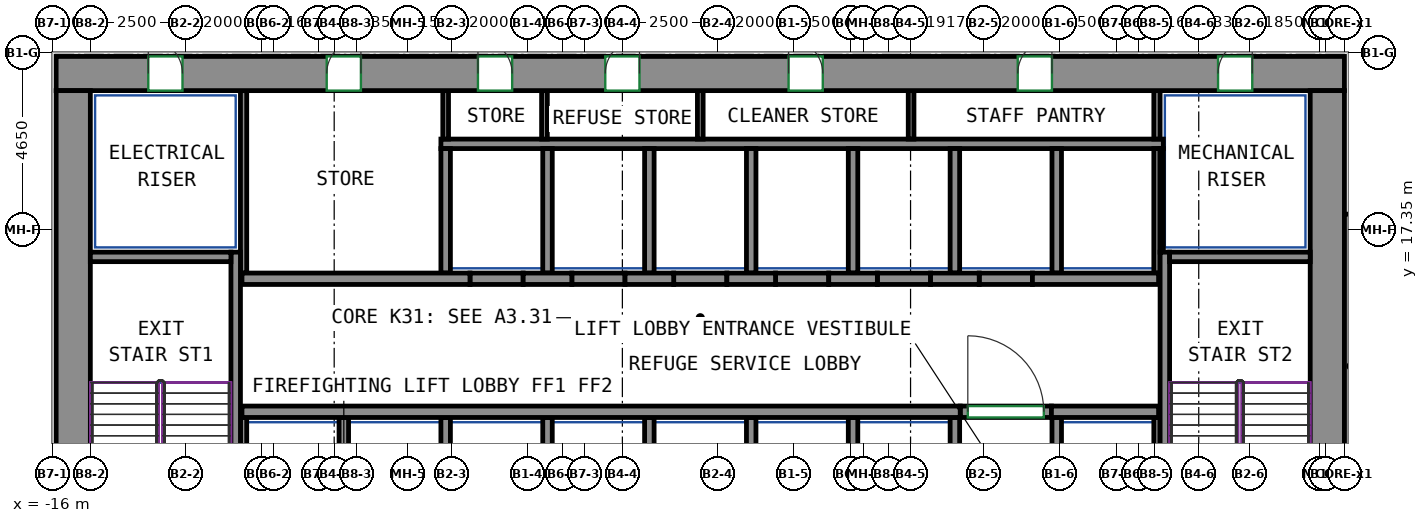
"""IFC4 building model, lengths in metres.
Left out: names, types, materials, properties, quantities, classifications, styles, units other than length and angle.
Written with IfcOpenShell. Run it as: python <this file> out.ifc"""

import sys

from ifc_helpers import new_model, si_unit, direction, frame, frame_2d, origin, place, context, subcontext, project, spatial, rectangle, extrude, source, transform, mapped, element, fill, save


model = new_model("IFC4")
c1 = context("Model", 3, precision=1e-05, world=origin(), true_north=direction((0.0, 1.0)))
c2 = subcontext(c1, "Body", "Model", "MODEL_VIEW")
j1 = project(units=[si_unit("LENGTHUNIT", "METRE"), si_unit("PLANEANGLEUNIT", "RADIAN")], contexts=[c1])
p1 = place(None, origin())
s1 = spatial("IfcSite", under=j1, at=p1, CompositionType="ELEMENT")
p2 = place(p1, origin())
s2 = spatial("IfcBuilding", under=s1, at=p2, CompositionType="ELEMENT")
p3 = place(p2, frame((0.0, 0.0, 128.6)))
s3 = spatial("IfcBuildingStorey", under=s2, at=p3, CompositionType="ELEMENT", Elevation=128.6)
m1 = source(origin(), c2, "Body", "SweptSolid", [
    extrude(rectangle(XDim=33.9, YDim=0.9, at=frame_2d((16.95, 0.0))), origin(), (0.0, 0.0, 1.0), 9.5),
])
p4 = place(p3, frame((-15.9, 21.45, 0.0), z_axis=(0.0, 0.0, 1.0), x_axis=(1.0, 0.0, 0.0)))
e1 = element("IfcWall", 1, at=p4, inside=s3, PredefinedType="SHEAR", context=c2, shape_type="MappedRepresentation", body=[
    mapped(m1, transform((0.0, 0.0, 0.0))),
])
p5 = place(p4, frame((7.12, 0.0, 0.0)))
e2 = element("IfcOpeningElement", 2, at=p5, cuts=e1, PredefinedType="OPENING", context=c2, shape_type="SweptSolid", body=[
    extrude(rectangle(XDim=0.9, YDim=2.1, at=frame_2d((0.45, 1.05))), frame((0.0, 0.46, 0.0), z_axis=(0.0, -1.0, 0.0), x_axis=(1.0, 0.0, 0.0)), (0.0, 0.0, 1.0), 0.92),
])
p6 = place(p4, frame((11.1, 0.0, 0.0)))
e3 = element("IfcOpeningElement", 3, at=p6, cuts=e1, PredefinedType="OPENING", context=c2, shape_type="SweptSolid", body=[
    extrude(rectangle(XDim=0.9, YDim=2.1, at=frame_2d((0.45, 1.05))), frame((0.0, 0.46, 0.0), z_axis=(0.0, -1.0, 0.0), x_axis=(1.0, 0.0, 0.0)), (0.0, 0.0, 1.0), 0.92),
])
p7 = place(p4, frame((14.45, 0.0, 0.0)))
e4 = element("IfcOpeningElement", 4, at=p7, cuts=e1, PredefinedType="OPENING", context=c2, shape_type="SweptSolid", body=[
    extrude(rectangle(XDim=0.9, YDim=2.1, at=frame_2d((0.45, 1.05))), frame((0.0, 0.46, 0.0), z_axis=(0.0, -1.0, 0.0), x_axis=(1.0, 0.0, 0.0)), (0.0, 0.0, 1.0), 0.92),
])
p8 = place(p4, frame((19.274, 0.0, 0.0)))
e5 = element("IfcOpeningElement", 5, at=p8, cuts=e1, PredefinedType="OPENING", context=c2, shape_type="SweptSolid", body=[
    extrude(rectangle(XDim=0.9, YDim=2.1, at=frame_2d((0.45, 1.05))), frame((0.0, 0.46, 0.0), z_axis=(0.0, -1.0, 0.0), x_axis=(1.0, 0.0, 0.0)), (0.0, 0.0, 1.0), 0.92),
])
p9 = place(p4, frame((25.304, 0.0, 0.0)))
e6 = element("IfcOpeningElement", 6, at=p9, cuts=e1, PredefinedType="OPENING", context=c2, shape_type="SweptSolid", body=[
    extrude(rectangle(XDim=0.9, YDim=2.1, at=frame_2d((0.45, 1.05))), frame((0.0, 0.46, 0.0), z_axis=(0.0, -1.0, 0.0), x_axis=(1.0, 0.0, 0.0)), (0.0, 0.0, 1.0), 0.92),
])
p10 = place(p4, frame((2.425, 0.0, 0.0)))
e7 = element("IfcOpeningElement", 7, at=p10, cuts=e1, PredefinedType="OPENING", context=c2, shape_type="SweptSolid", body=[
    extrude(rectangle(XDim=0.9, YDim=2.1, at=frame_2d((0.45, 1.05))), frame((0.0, 0.46, 0.0), z_axis=(0.0, -1.0, 0.0), x_axis=(1.0, 0.0, 0.0)), (0.0, 0.0, 1.0), 0.92),
])
p11 = place(p4, frame((30.575, 0.0, 0.0)))
e8 = element("IfcOpeningElement", 8, at=p11, cuts=e1, PredefinedType="OPENING", context=c2, shape_type="SweptSolid", body=[
    extrude(rectangle(XDim=0.9, YDim=2.1, at=frame_2d((0.45, 1.05))), frame((0.0, 0.46, 0.0), z_axis=(0.0, -1.0, 0.0), x_axis=(1.0, 0.0, 0.0)), (0.0, 0.0, 1.0), 0.92),
])
m2 = source(origin(), c2, "Body", "SweptSolid", [
    extrude(rectangle(XDim=12.0, YDim=0.9, at=frame_2d((6.0, 0.0))), origin(), (0.0, 0.0, 1.0), 9.5),
])
for number, where, z_axis, x_axis in (
    (9, (-15.45, 9.0, 0.0), (0.0, 0.0, 1.0), (0.0, 1.0, 0.0)),
    (10, (17.55, 9.0, 0.0), (0.0, 0.0, 1.0), (0.0, 1.0, 0.0)),
):
    element("IfcWall", number, at=place(p3, frame(where, z_axis=z_axis, x_axis=x_axis)), inside=s3, PredefinedType="SHEAR", context=c2, shape_type="MappedRepresentation", body=[
        mapped(m2, transform((0.0, 0.0, 0.0))),
    ])
m3 = source(origin(), c2, "Body", "SweptSolid", [
    extrude(rectangle(XDim=7.75, YDim=0.25, at=frame_2d((3.875, 0.0))), origin(), (0.0, 0.0, 1.0), 9.5),
])
p12 = place(p3, frame((-11.175, 9.0, 0.0), z_axis=(0.0, 0.0, 1.0), x_axis=(0.0, 1.0, 0.0)))
e11 = element("IfcWall", 11, at=p12, inside=s3, PredefinedType="SHEAR", context=c2, shape_type="MappedRepresentation", body=[
    mapped(m3, transform((0.0, 0.0, 0.0))),
])
m4 = source(origin(), c2, "Body", "SweptSolid", [
    extrude(rectangle(XDim=3.7, YDim=0.25, at=frame_2d((1.85, 0.0))), origin(), (0.0, 0.0, 1.0), 9.5),
])
p13 = place(p3, frame((-15.0, 16.625, 0.0), z_axis=(0.0, 0.0, 1.0), x_axis=(1.0, 0.0, 0.0)))
e12 = element("IfcWall", 12, at=p13, inside=s3, PredefinedType="SHEAR", context=c2, shape_type="MappedRepresentation", body=[
    mapped(m4, transform((0.0, 0.0, 0.0))),
])
p14 = place(p3, frame((13.275, 9.0, 0.0), z_axis=(0.0, 0.0, 1.0), x_axis=(0.0, 1.0, 0.0)))
e13 = element("IfcWall", 13, at=p14, inside=s3, PredefinedType="SHEAR", context=c2, shape_type="MappedRepresentation", body=[
    mapped(m3, transform((0.0, 0.0, 0.0))),
])
m5 = source(origin(), c2, "Body", "SweptSolid", [
    extrude(rectangle(XDim=3.7, YDim=0.25, at=frame_2d((1.85, 0.0))), origin(), (0.0, 0.0, 1.0), 9.5),
])
p15 = place(p3, frame((13.4, 16.625, 0.0), z_axis=(0.0, 0.0, 1.0), x_axis=(1.0, 0.0, 0.0)))
e14 = element("IfcWall", 14, at=p15, inside=s3, PredefinedType="SHEAR", context=c2, shape_type="MappedRepresentation", body=[
    mapped(m5, transform((0.0, 0.0, 0.0))),
])
m6 = source(origin(), c2, "Body", "SweptSolid", [
    extrude(rectangle(XDim=8.0, YDim=0.35, at=frame_2d((4.0, 0.0))), origin(), (0.0, 0.0, 1.0), 9.5),
])
p16 = place(p3, frame((18.175, 9.75, 0.0), z_axis=(0.0, 0.0, 1.0), x_axis=(0.0, 1.0, 0.0)))
e15 = element("IfcWall", 15, at=p16, inside=s3, PredefinedType="SHEAR", context=c2, shape_type="MappedRepresentation", body=[
    mapped(m6, transform((0.0, 0.0, 0.0))),
])
m7 = source(origin(), c2, "Body", "SweptSolid", [
    extrude(rectangle(XDim=18.9, YDim=0.3, at=frame_2d((9.45, 0.0))), origin(), (0.0, 0.0, 1.0), 9.5),
])
p17 = place(p3, frame((-11.01, 12.55, 0.0), z_axis=(0.0, 0.0, 1.0), x_axis=(1.0, 0.0, 0.0)))
e16 = element("IfcWall", 16, at=p17, inside=s3, PredefinedType="SHEAR", context=c2, shape_type="MappedRepresentation", body=[
    mapped(m7, transform((0.0, 0.0, 0.0))),
])
m8 = source(origin(), c2, "Body", "SweptSolid", [
    extrude(rectangle(XDim=2.82, YDim=0.3, at=frame_2d((1.41, 0.0))), origin(), (0.0, 0.0, 1.0), 9.5),
])
p18 = place(p3, frame((10.29, 12.55, 0.0), z_axis=(0.0, 0.0, 1.0), x_axis=(1.0, 0.0, 0.0)))
e17 = element("IfcWall", 17, at=p18, inside=s3, PredefinedType="SHEAR", context=c2, shape_type="MappedRepresentation", body=[
    mapped(m8, transform((0.0, 0.0, 0.0))),
])
m9 = source(origin(), c2, "Body", "SweptSolid", [
    extrude(rectangle(XDim=6.0, YDim=0.3, at=frame_2d((3.0, 0.0))), origin(), (0.0, 0.0, 1.0), 9.5),
])
p19 = place(p3, frame((-11.01, 16.05, 0.0), z_axis=(0.0, 0.0, 1.0), x_axis=(1.0, 0.0, 0.0)))
e18 = element("IfcWall", 18, at=p19, inside=s3, PredefinedType="SHEAR", context=c2, shape_type="MappedRepresentation", body=[
    mapped(m9, transform((0.0, 0.0, 0.0))),
])
m10 = source(origin(), c2, "Body", "SweptSolid", [
    extrude(rectangle(XDim=1.28, YDim=0.3, at=frame_2d((0.64, 0.0))), origin(), (0.0, 0.0, 1.0), 9.5),
])
for number, where, z_axis, x_axis in (
    (19, (-3.61, 16.05, 0.0), (0.0, 0.0, 1.0), (1.0, 0.0, 0.0)),
    (20, (-0.93, 16.05, 0.0), (0.0, 0.0, 1.0), (1.0, 0.0, 0.0)),
    (21, (1.75, 16.05, 0.0), (0.0, 0.0, 1.0), (1.0, 0.0, 0.0)),
    (22, (4.43, 16.05, 0.0), (0.0, 0.0, 1.0), (1.0, 0.0, 0.0)),
):
    element("IfcWall", number, at=place(p3, frame(where, z_axis=z_axis, x_axis=x_axis)), inside=s3, PredefinedType="SHEAR", context=c2, shape_type="MappedRepresentation", body=[
        mapped(m10, transform((0.0, 0.0, 0.0))),
    ])
m11 = source(origin(), c2, "Body", "SweptSolid", [
    extrude(rectangle(XDim=1.28, YDim=0.3, at=frame_2d((0.64, 0.0))), origin(), (0.0, 0.0, 1.0), 9.5),
])
p20 = place(p3, frame((7.11, 16.05, 0.0), z_axis=(0.0, 0.0, 1.0), x_axis=(1.0, 0.0, 0.0)))
e23 = element("IfcWall", 23, at=p20, inside=s3, PredefinedType="SHEAR", context=c2, shape_type="MappedRepresentation", body=[
    mapped(m11, transform((0.0, 0.0, 0.0))),
])
m12 = source(origin(), c2, "Body", "SweptSolid", [
    extrude(rectangle(XDim=3.32, YDim=0.3, at=frame_2d((1.66, 0.0))), origin(), (0.0, 0.0, 1.0), 9.5),
])
p21 = place(p3, frame((9.79, 16.05, 0.0), z_axis=(0.0, 0.0, 1.0), x_axis=(1.0, 0.0, 0.0)))
e24 = element("IfcWall", 24, at=p21, inside=s3, PredefinedType="SHEAR", context=c2, shape_type="MappedRepresentation", body=[
    mapped(m12, transform((0.0, 0.0, 0.0))),
])
m13 = source(origin(), c2, "Body", "SweptSolid", [
    extrude(rectangle(XDim=2.4, YDim=0.3, at=frame_2d((1.2, 0.0))), origin(), (0.0, 0.0, 1.0), 9.5),
])
p22 = place(p3, frame((7.89, 12.55, 0.0), z_axis=(0.0, 0.0, 1.0), x_axis=(1.0, 0.0, 0.0)))
e25 = element("IfcWall", 25, at=p22, inside=s3, PredefinedType="PARTITIONING", context=c2, shape_type="MappedRepresentation", body=[
    mapped(m13, transform((0.0, 0.0, 0.0))),
])
p23 = place(p22, frame((0.2, 0.0, 0.0)))
e26 = element("IfcOpeningElement", 26, at=p23, cuts=e25, PredefinedType="OPENING", context=c2, shape_type="SweptSolid", body=[
    extrude(rectangle(XDim=2.0, YDim=2.1, at=frame_2d((1.0, 1.05))), frame((0.0, 0.16, 0.0), z_axis=(0.0, -1.0, 0.0), x_axis=(1.0, 0.0, 0.0)), (0.0, 0.0, 1.0), 0.32),
])
m14 = source(origin(), c2, "Body", "SweptSolid", [
    extrude(rectangle(XDim=1.4, YDim=0.3, at=frame_2d((0.7, 0.0))), origin(), (0.0, 0.0, 1.0), 9.5),
])
p24 = place(p3, frame((-5.01, 16.05, 0.0), z_axis=(0.0, 0.0, 1.0), x_axis=(1.0, 0.0, 0.0)))
e27 = element("IfcWall", 27, at=p24, inside=s3, PredefinedType="PARTITIONING", context=c2, shape_type="MappedRepresentation", body=[
    mapped(m14, transform((0.0, 0.0, 0.0))),
])
m15 = source(origin(), c2, "Body", "SweptSolid", [
    extrude(rectangle(XDim=1.4, YDim=0.3, at=frame_2d((0.7, 0.0))), origin(), (0.0, 0.0, 1.0), 9.5),
])
p25 = place(p3, frame((-2.33, 16.05, 0.0), z_axis=(0.0, 0.0, 1.0), x_axis=(1.0, 0.0, 0.0)))
e28 = element("IfcWall", 28, at=p25, inside=s3, PredefinedType="PARTITIONING", context=c2, shape_type="MappedRepresentation", body=[
    mapped(m15, transform((0.0, 0.0, 0.0))),
])
for number, where, z_axis, x_axis in (
    (29, (0.35, 16.05, 0.0), (0.0, 0.0, 1.0), (1.0, 0.0, 0.0)),
    (30, (3.03, 16.05, 0.0), (0.0, 0.0, 1.0), (1.0, 0.0, 0.0)),
):
    element("IfcWall", number, at=place(p3, frame(where, z_axis=z_axis, x_axis=x_axis)), inside=s3, PredefinedType="PARTITIONING", context=c2, shape_type="MappedRepresentation", body=[
        mapped(m14, transform((0.0, 0.0, 0.0))),
    ])
for number, where, z_axis, x_axis in (
    (31, (5.71, 16.05, 0.0), (0.0, 0.0, 1.0), (1.0, 0.0, 0.0)),
    (32, (8.39, 16.05, 0.0), (0.0, 0.0, 1.0), (1.0, 0.0, 0.0)),
):
    element("IfcWall", number, at=place(p3, frame(where, z_axis=z_axis, x_axis=x_axis)), inside=s3, PredefinedType="PARTITIONING", context=c2, shape_type="MappedRepresentation", body=[
        mapped(m15, transform((0.0, 0.0, 0.0))),
    ])
m16 = source(origin(), c2, "Body", "SweptSolid", [
    extrude(rectangle(XDim=19.01, YDim=0.25, at=frame_2d((9.505, 0.0))), origin(), (0.0, 0.0, 1.0), 9.5),
])
p26 = place(p3, frame((-5.775, 19.6, 0.0), z_axis=(0.0, 0.0, 1.0), x_axis=(1.0, 0.0, 0.0)))
e33 = element("IfcWall", 33, at=p26, inside=s3, PredefinedType="PARTITIONING", context=c2, shape_type="MappedRepresentation", body=[
    mapped(m16, transform((0.0, 0.0, 0.0))),
])
m17 = source(origin(), c2, "Body", "SweptSolid", [
    extrude(rectangle(XDim=3.275, YDim=0.165, at=frame_2d((1.638, 0.0))), origin(), (0.0, 0.0, 1.0), 9.5),
])
p27 = place(p3, frame((13.067, 16.2, 0.0), z_axis=(0.0, 0.0, 1.0), x_axis=(0.0, 1.0, 0.0)))
e34 = element("IfcWall", 34, at=p27, inside=s3, PredefinedType="PARTITIONING", context=c2, shape_type="MappedRepresentation", body=[
    mapped(m17, transform((0.0, 0.0, 0.0))),
])
m18 = source(origin(), c2, "Body", "SweptSolid", [
    extrude(rectangle(XDim=1.275, YDim=0.165, at=frame_2d((0.637, 0.0))), origin(), (0.0, 0.0, 1.0), 9.5),
])
p28 = place(p3, frame((13.067, 19.725, 0.0), z_axis=(0.0, 0.0, 1.0), x_axis=(0.0, 1.0, 0.0)))
e35 = element("IfcWall", 35, at=p28, inside=s3, PredefinedType="PARTITIONING", context=c2, shape_type="MappedRepresentation", body=[
    mapped(m18, transform((0.0, 0.0, 0.0))),
])
m19 = source(origin(), c2, "Body", "SweptSolid", [
    extrude(rectangle(XDim=4.8, YDim=0.165, at=frame_2d((2.4, 0.0))), origin(), (0.0, 0.0, 1.0), 9.5),
])
p29 = place(p3, frame((-10.968, 16.2, 0.0), z_axis=(0.0, 0.0, 1.0), x_axis=(0.0, 1.0, 0.0)))
e36 = element("IfcWall", 36, at=p29, inside=s3, PredefinedType="PARTITIONING", context=c2, shape_type="MappedRepresentation", body=[
    mapped(m19, transform((0.0, 0.0, 0.0))),
])
m20 = source(origin(), c2, "Body", "SweptSolid", [
    extrude(rectangle(XDim=3.275, YDim=0.25, at=frame_2d((1.638, 0.0))), origin(), (0.0, 0.0, 1.0), 9.5),
])
p30 = place(p3, frame((10.43, 16.2, 0.0), z_axis=(0.0, 0.0, 1.0), x_axis=(0.0, 1.0, 0.0)))
e37 = element("IfcWall", 37, at=p30, inside=s3, PredefinedType="PARTITIONING", context=c2, shape_type="MappedRepresentation", body=[
    mapped(m20, transform((0.0, 0.0, 0.0))),
])
m21 = source(origin(), c2, "Body", "SweptSolid", [
    extrude(rectangle(XDim=2.725, YDim=0.085, at=frame_2d((1.363, 0.0))), origin(), (0.0, 0.0, 1.0), 9.5),
])
p31 = place(p3, frame((13.192, 16.75, 0.0), z_axis=(0.0, 0.0, 1.0), x_axis=(0.0, 1.0, 0.0)))
e38 = element("IfcWall", 38, at=p31, inside=s3, PredefinedType="PARTITIONING", context=c2, shape_type="MappedRepresentation", body=[
    mapped(m21, transform((0.0, 0.0, 0.0))),
])
for number, where, z_axis, x_axis in (
    (39, (2.39, 16.2, 0.0), (0.0, 0.0, 1.0), (0.0, 1.0, 0.0)),
    (40, (5.07, 16.2, 0.0), (0.0, 0.0, 1.0), (0.0, 1.0, 0.0)),
    (41, (7.75, 16.2, 0.0), (0.0, 0.0, 1.0), (0.0, 1.0, 0.0)),
    (42, (-0.29, 16.2, 0.0), (0.0, 0.0, 1.0), (0.0, 1.0, 0.0)),
    (43, (-2.97, 16.2, 0.0), (0.0, 0.0, 1.0), (0.0, 1.0, 0.0)),
    (44, (-5.65, 16.2, 0.0), (0.0, 0.0, 1.0), (0.0, 1.0, 0.0)),
):
    element("IfcWall", number, at=place(p3, frame(where, z_axis=z_axis, x_axis=x_axis)), inside=s3, PredefinedType="PARTITIONING", context=c2, shape_type="MappedRepresentation", body=[
        mapped(m20, transform((0.0, 0.0, 0.0))),
    ])
m22 = source(origin(), c2, "Body", "SweptSolid", [
    extrude(rectangle(XDim=3.4, YDim=0.25, at=frame_2d((1.7, 0.0))), origin(), (0.0, 0.0, 1.0), 9.5),
])
p32 = place(p3, frame((10.43, 9.0, 0.0), z_axis=(0.0, 0.0, 1.0), x_axis=(0.0, 1.0, 0.0)))
e45 = element("IfcWall", 45, at=p32, inside=s3, PredefinedType="PARTITIONING", context=c2, shape_type="MappedRepresentation", body=[
    mapped(m22, transform((0.0, 0.0, 0.0))),
])
m23 = source(origin(), c2, "Body", "SweptSolid", [
    extrude(rectangle(XDim=3.4, YDim=0.165, at=frame_2d((1.7, 0.0))), origin(), (0.0, 0.0, 1.0), 9.5),
])
p33 = place(p3, frame((13.067, 9.0, 0.0), z_axis=(0.0, 0.0, 1.0), x_axis=(0.0, 1.0, 0.0)))
e46 = element("IfcWall", 46, at=p33, inside=s3, PredefinedType="PARTITIONING", context=c2, shape_type="MappedRepresentation", body=[
    mapped(m23, transform((0.0, 0.0, 0.0))),
])
for number, where, z_axis, x_axis in (
    (47, (2.39, 9.0, 0.0), (0.0, 0.0, 1.0), (0.0, 1.0, 0.0)),
    (48, (5.07, 9.0, 0.0), (0.0, 0.0, 1.0), (0.0, 1.0, 0.0)),
    (49, (7.75, 9.0, 0.0), (0.0, 0.0, 1.0), (0.0, 1.0, 0.0)),
    (50, (-0.29, 9.0, 0.0), (0.0, 0.0, 1.0), (0.0, 1.0, 0.0)),
):
    element("IfcWall", number, at=place(p3, frame(where, z_axis=z_axis, x_axis=x_axis)), inside=s3, PredefinedType="PARTITIONING", context=c2, shape_type="MappedRepresentation", body=[
        mapped(m22, transform((0.0, 0.0, 0.0))),
    ])
p34 = place(p3, frame((-10.968, 9.0, 0.0), z_axis=(0.0, 0.0, 1.0), x_axis=(0.0, 1.0, 0.0)))
e51 = element("IfcWall", 51, at=p34, inside=s3, PredefinedType="PARTITIONING", context=c2, shape_type="MappedRepresentation", body=[
    mapped(m23, transform((0.0, 0.0, 0.0))),
])
for number, where, z_axis, x_axis in (
    (52, (-2.97, 9.0, 0.0), (0.0, 0.0, 1.0), (0.0, 1.0, 0.0)),
    (53, (-5.65, 9.0, 0.0), (0.0, 0.0, 1.0), (0.0, 1.0, 0.0)),
    (54, (-8.33, 9.0, 0.0), (0.0, 0.0, 1.0), (0.0, 1.0, 0.0)),
):
    element("IfcWall", number, at=place(p3, frame(where, z_axis=z_axis, x_axis=x_axis)), inside=s3, PredefinedType="PARTITIONING", context=c2, shape_type="MappedRepresentation", body=[
        mapped(m22, transform((0.0, 0.0, 0.0))),
    ])
m24 = source(origin(), c2, "Body", "SweptSolid", [
    extrude(rectangle(XDim=1.275, YDim=0.15, at=frame_2d((0.637, 0.0))), origin(), (0.0, 0.0, 1.0), 9.5),
])
for number, where, z_axis, x_axis in (
    (55, (-5.65, 19.725, 0.0), (0.0, 0.0, 1.0), (0.0, 1.0, 0.0)),
    (56, (-3.05, 19.725, 0.0), (0.0, 0.0, 1.0), (0.0, 1.0, 0.0)),
    (57, (1.05, 19.725, 0.0), (0.0, 0.0, 1.0), (0.0, 1.0, 0.0)),
    (58, (6.598, 19.725, 0.0), (0.0, 0.0, 1.0), (0.0, 1.0, 0.0)),
):
    element("IfcWall", number, at=place(p3, frame(where, z_axis=z_axis, x_axis=x_axis)), inside=s3, PredefinedType="PARTITIONING", context=c2, shape_type="MappedRepresentation", body=[
        mapped(m24, transform((0.0, 0.0, 0.0))),
    ])
p35 = place(p23, origin())
e59 = element("IfcDoor", 59, at=p35, inside=s3, OperationType="DOUBLE_DOOR_SINGLE_SWING", PredefinedType="DOOR", context=c2, shape_type="SweptSolid", body=[
    extrude(rectangle(XDim=2.0, YDim=2.1, at=frame_2d((1.0, 1.05))), frame((0.0, 0.025, 0.0), z_axis=(0.0, -1.0, 0.0), x_axis=(1.0, 0.0, 0.0)), (0.0, 0.0, 1.0), 0.05),
])
fill(e26, e59)
p36 = place(p5, origin())
e60 = element("IfcDoor", 60, at=p36, inside=s3, OperationType="SINGLE_SWING_RIGHT", PredefinedType="DOOR", context=c2, shape_type="SweptSolid", body=[
    extrude(rectangle(XDim=0.9, YDim=2.1, at=frame_2d((0.45, 1.05))), frame((0.0, -0.305, 0.0), z_axis=(0.0, -1.0, 0.0), x_axis=(1.0, 0.0, 0.0)), (0.0, 0.0, 1.0), 0.05),
])
fill(e2, e60)
p37 = place(p6, origin())
e61 = element("IfcDoor", 61, at=p37, inside=s3, OperationType="SINGLE_SWING_LEFT", PredefinedType="DOOR", context=c2, shape_type="SweptSolid", body=[
    extrude(rectangle(XDim=0.9, YDim=2.1, at=frame_2d((0.45, 1.05))), frame((0.0, -0.305, 0.0), z_axis=(0.0, -1.0, 0.0), x_axis=(1.0, 0.0, 0.0)), (0.0, 0.0, 1.0), 0.05),
])
fill(e3, e61)
p38 = place(p7, origin())
e62 = element("IfcDoor", 62, at=p38, inside=s3, OperationType="SINGLE_SWING_RIGHT", PredefinedType="DOOR", context=c2, shape_type="SweptSolid", body=[
    extrude(rectangle(XDim=0.9, YDim=2.1, at=frame_2d((0.45, 1.05))), frame((0.0, -0.305, 0.0), z_axis=(0.0, -1.0, 0.0), x_axis=(1.0, 0.0, 0.0)), (0.0, 0.0, 1.0), 0.05),
])
fill(e4, e62)
p39 = place(p8, origin())
e63 = element("IfcDoor", 63, at=p39, inside=s3, OperationType="SINGLE_SWING_LEFT", PredefinedType="DOOR", context=c2, shape_type="SweptSolid", body=[
    extrude(rectangle(XDim=0.9, YDim=2.1, at=frame_2d((0.45, 1.05))), frame((0.0, -0.305, 0.0), z_axis=(0.0, -1.0, 0.0), x_axis=(1.0, 0.0, 0.0)), (0.0, 0.0, 1.0), 0.05),
])
fill(e5, e63)
p40 = place(p9, origin())
e64 = element("IfcDoor", 64, at=p40, inside=s3, OperationType="SINGLE_SWING_RIGHT", PredefinedType="DOOR", context=c2, shape_type="SweptSolid", body=[
    extrude(rectangle(XDim=0.9, YDim=2.1, at=frame_2d((0.45, 1.05))), frame((0.0, -0.305, 0.0), z_axis=(0.0, -1.0, 0.0), x_axis=(1.0, 0.0, 0.0)), (0.0, 0.0, 1.0), 0.05),
])
fill(e6, e64)
p41 = place(p10, origin())
e65 = element("IfcDoor", 65, at=p41, inside=s3, OperationType="SINGLE_SWING_LEFT", PredefinedType="DOOR", context=c2, shape_type="SweptSolid", body=[
    extrude(rectangle(XDim=0.9, YDim=2.1, at=frame_2d((0.45, 1.05))), frame((0.0, -0.305, 0.0), z_axis=(0.0, -1.0, 0.0), x_axis=(1.0, 0.0, 0.0)), (0.0, 0.0, 1.0), 0.05),
])
fill(e7, e65)
p42 = place(p11, origin())
e66 = element("IfcDoor", 66, at=p42, inside=s3, OperationType="SINGLE_SWING_RIGHT", PredefinedType="DOOR", context=c2, shape_type="SweptSolid", body=[
    extrude(rectangle(XDim=0.9, YDim=2.1, at=frame_2d((0.45, 1.05))), frame((0.0, -0.305, 0.0), z_axis=(0.0, -1.0, 0.0), x_axis=(1.0, 0.0, 0.0)), (0.0, 0.0, 1.0), 0.05),
])
fill(e8, e66)
save(model, sys.argv[1])
